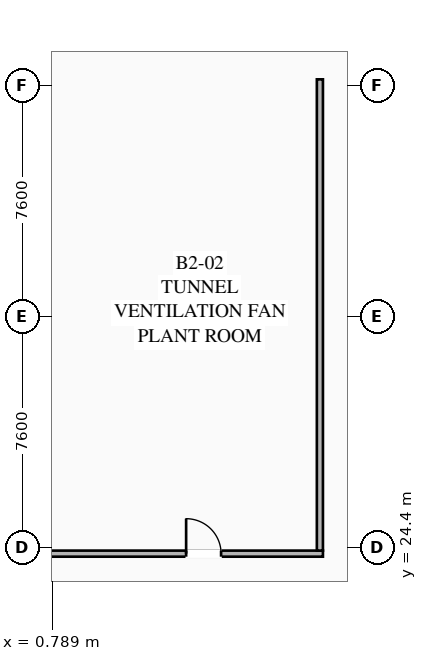
"""IFC4 building model, lengths in metres.
Left out: names, types, materials, properties, quantities, classifications, styles, units other than length and angle.
Written with IfcOpenShell. Run it as: python <this file> out.ifc"""

import sys

from ifc_helpers import new_model, si_unit, direction, frame, frame_2d, origin, place, context, subcontext, project, spatial, rectangle, extrude, element, fill, save


model = new_model("IFC4")
c1 = context("Model", 3, precision=1e-05, world=origin(), true_north=direction((0.0, 1.0)))
c2 = subcontext(c1, "Body", "Model", "MODEL_VIEW")
j1 = project(units=[si_unit("LENGTHUNIT", "METRE"), si_unit("PLANEANGLEUNIT", "RADIAN")], contexts=[c1])
p1 = place(None, origin())
s1 = spatial("IfcSite", under=j1, at=p1, CompositionType="ELEMENT")
p2 = place(p1, origin())
s2 = spatial("IfcBuilding", under=s1, at=p2, CompositionType="ELEMENT")
p3 = place(p2, frame((0.0, 0.0, -11.0)))
s3 = spatial("IfcBuildingStorey", under=s2, at=p3, CompositionType="ELEMENT", Elevation=-11.0)
p4 = place(p3, frame((0.7, 24.2, 0.0), z_axis=(0.0, 0.0, 1.0), x_axis=(1.0, 0.0, 0.0)))
e1 = element("IfcWall", 1, at=p4, inside=s3, PredefinedType="SOLIDWALL", context=c2, shape_type="SweptSolid", body=[
    extrude(rectangle(XDim=9.0, YDim=0.2, at=frame_2d((4.5, 0.0))), origin(), (0.0, 0.0, 1.0), 4.283),
])
p5 = place(p4, frame((4.5, 0.0, 0.0)))
e2 = element("IfcOpeningElement", 2, at=p5, cuts=e1, PredefinedType="OPENING", context=c2, shape_type="SweptSolid", body=[
    extrude(rectangle(XDim=1.15, YDim=2.2, at=frame_2d((0.575, 1.1))), frame((0.0, 0.11, 0.0), z_axis=(0.0, -1.0, 0.0), x_axis=(1.0, 0.0, 0.0)), (0.0, 0.0, 1.0), 0.22),
])
p6 = place(p3, frame((9.6, 24.3, 0.0), z_axis=(0.0, 0.0, 1.0), x_axis=(0.0, 1.0, 0.0)))
e3 = element("IfcWall", 3, at=p6, inside=s3, PredefinedType="SOLIDWALL", context=c2, shape_type="SweptSolid", body=[
    extrude(rectangle(XDim=15.5, YDim=0.2, at=frame_2d((7.75, 0.0))), origin(), (0.0, 0.0, 1.0), 4.283),
])
p7 = place(p5, origin())
e4 = element("IfcDoor", 4, at=p7, inside=s3, OperationType="SINGLE_SWING_LEFT", PredefinedType="DOOR", context=c2, shape_type="SweptSolid", body=[
    extrude(rectangle(XDim=1.15, YDim=2.2, at=frame_2d((0.575, 1.1))), frame((0.0, 0.025, 0.0), z_axis=(0.0, -1.0, 0.0), x_axis=(1.0, 0.0, 0.0)), (0.0, 0.0, 1.0), 0.05),
])
fill(e2, e4)
save(model, sys.argv[1])
